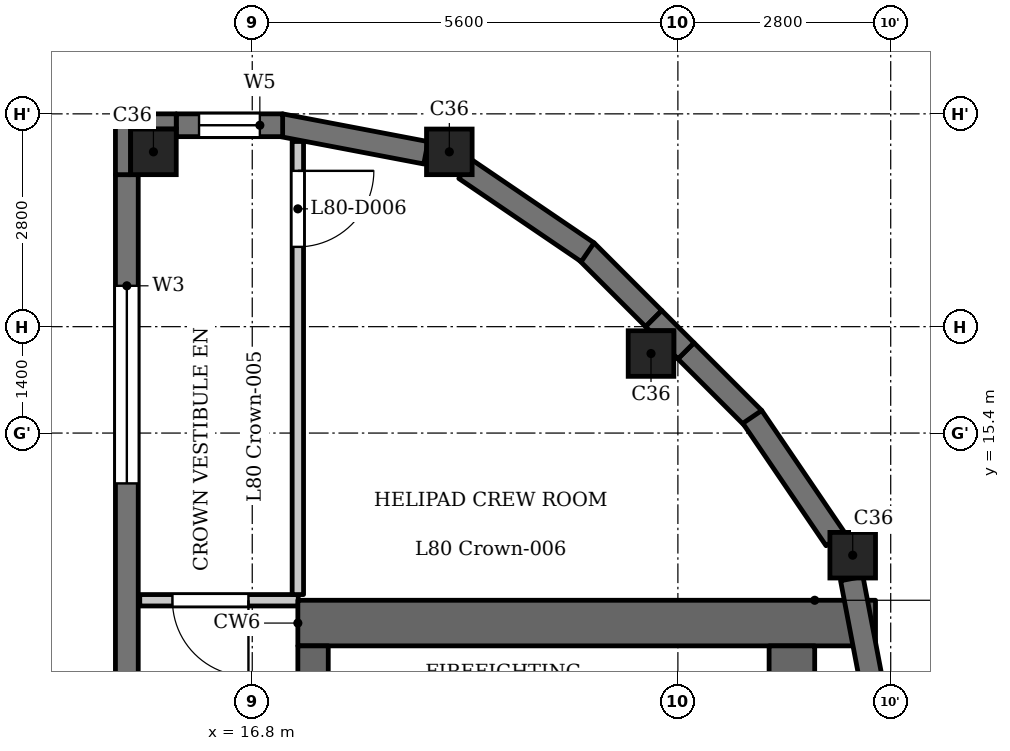
"""IFC4 building model, lengths in metres.
Left out: names, types, materials, properties, quantities, classifications, styles, units other than length and angle.
Written with IfcOpenShell. Run it as: python <this file> out.ifc"""

import sys

from ifc_helpers import new_model, si_unit, direction, frame, frame_2d, origin, origin_2d, place, context, subcontext, project, spatial, polyline, rectangle, outline, extrude, element, fill, save


model = new_model("IFC4")
c1 = context("Model", 3, precision=1e-05, world=origin(), true_north=direction((0.0, 1.0)))
c2 = subcontext(c1, "Body", "Model", "MODEL_VIEW")
j1 = project(units=[si_unit("LENGTHUNIT", "METRE"), si_unit("PLANEANGLEUNIT", "RADIAN")], contexts=[c1])
p1 = place(None, origin())
s1 = spatial("IfcSite", under=j1, at=p1, CompositionType="ELEMENT")
p2 = place(p1, origin())
s2 = spatial("IfcBuilding", under=s1, at=p2, CompositionType="ELEMENT")
p3 = place(p2, frame((0.0, 0.0, 310.4)))
s3 = spatial("IfcBuildingStorey", under=s2, at=p3, CompositionType="ELEMENT", Elevation=310.4)
for number, where, z_axis, x_axis in (
    (1, (15.5, 19.1, 0.0), (0.0, 0.0, 1.0), (1.0, 0.0, 0.0)),
    (2, (19.393, 19.1, 0.0), (0.0, 0.0, 1.0), (1.0, 0.0, 0.0)),
    (3, (22.046, 16.446, 0.0), (0.0, 0.0, 1.0), (1.0, 0.0, 0.0)),
    (4, (24.7, 13.793, 0.0), (0.0, 0.0, 1.0), (1.0, 0.0, 0.0)),
):
    element("IfcColumn", number, at=place(p3, frame(where, z_axis=z_axis, x_axis=x_axis)), inside=s3, PredefinedType="COLUMN", context=c2, shape_type="SweptSolid", body=[
        extrude(rectangle(XDim=0.6, YDim=0.6, at=origin_2d()), origin(), (0.0, 0.0, 1.0), 3.5),
    ])
p4 = place(p3, frame((15.15, 18.8, 0.0), z_axis=(0.0, 0.0, 1.0), x_axis=(0.0, -1.0, 0.0)))
e5 = element("IfcWall", 5, at=p4, inside=s3, PredefinedType="SOLIDWALL", context=c2, shape_type="SweptSolid", body=[
    extrude(rectangle(XDim=7.3, YDim=0.3, at=frame_2d((3.65, 0.0))), origin(), (0.0, 0.0, 1.0), 2.8),
])
p5 = place(p4, frame((1.462, 0.0, 0.9)))
e6 = element("IfcOpeningElement", 6, at=p5, cuts=e5, PredefinedType="OPENING", context=c2, shape_type="SweptSolid", body=[
    extrude(rectangle(XDim=2.6, YDim=1.25, at=frame_2d((1.3, 0.625))), frame((0.0, 0.16, 0.0), z_axis=(0.0, -1.0, 0.0), x_axis=(1.0, 0.0, 0.0)), (0.0, 0.0, 1.0), 0.32),
])
p6 = place(p3, frame((25.052, 11.573, 0.0), z_axis=(0.0, 0.0, 1.0), x_axis=(-0.187354129902, 0.982292436095, 0.0)))
e7 = element("IfcWall", 7, at=p6, inside=s3, PredefinedType="SOLIDWALL", context=c2, shape_type="SweptSolid", body=[
    extrude(rectangle(XDim=1.947, YDim=0.3, at=frame_2d((0.973, 0.0))), origin(), (0.0, 0.0, 1.0), 2.2),
])
p7 = place(p3, frame((24.474, 14.002, 0.0), z_axis=(0.0, 0.0, 1.0), x_axis=(-0.562025435703, 0.827119948752, 0.0)))
e8 = element("IfcWall", 8, at=p7, inside=s3, PredefinedType="SOLIDWALL", context=c2, shape_type="SweptSolid", body=[
    extrude(rectangle(XDim=1.948, YDim=0.3, at=frame_2d((0.974, 0.0))), origin(), (0.0, 0.0, 1.0), 2.2),
])
for number, where, z_axis, x_axis in (
    (9, (23.397, 15.591, 0.0), (0.0, 0.0, 1.0), (-0.707, 0.707, 0.0)),
    (10, (22.082, 16.906, 0.0), (0.0, 0.0, 1.0), (-0.707, 0.707, 0.0)),
):
    element("IfcWall", number, at=place(p3, frame(where, z_axis=z_axis, x_axis=x_axis)), inside=s3, PredefinedType="SOLIDWALL", context=c2, shape_type="SweptSolid", body=[
        extrude(rectangle(XDim=1.26, YDim=0.3, at=frame_2d((0.63, 0.0))), origin(), (0.0, 0.0, 1.0), 2.8),
    ])
for number, where, z_axis, x_axis in (
    (11, (21.213, 17.779, 0.0), (0.0, 0.0, 1.0), (-0.827, 0.562, 0.0)),
    (12, (19.085, 19.088, 0.0), (0.0, 0.0, 1.0), (-0.982, 0.187, 0.0)),
):
    element("IfcWall", number, at=place(p3, frame(where, z_axis=z_axis, x_axis=x_axis)), inside=s3, PredefinedType="SOLIDWALL", context=c2, shape_type="SweptSolid", body=[
        extrude(rectangle(XDim=1.948, YDim=0.3, at=frame_2d((0.974, 0.0))), origin(), (0.0, 0.0, 1.0), 2.2),
    ])
p8 = place(p3, frame((17.2, 19.45, 0.0), z_axis=(0.0, 0.0, 1.0), x_axis=(-1.0, 0.0, 0.0)))
e13 = element("IfcWall", 13, at=p8, inside=s3, PredefinedType="SOLIDWALL", context=c2, shape_type="SweptSolid", body=[
    extrude(rectangle(XDim=1.4, YDim=0.3, at=frame_2d((0.7, 0.0))), origin(), (0.0, 0.0, 1.0), 2.8),
])
p9 = place(p8, frame((0.3, 0.0, 0.6)))
e14 = element("IfcOpeningElement", 14, at=p9, cuts=e13, PredefinedType="OPENING", context=c2, shape_type="SweptSolid", body=[
    extrude(rectangle(XDim=0.8, YDim=1.55, at=frame_2d((0.4, 0.775))), frame((0.0, 0.16, 0.0), z_axis=(0.0, -1.0, 0.0), x_axis=(1.0, 0.0, 0.0)), (0.0, 0.0, 1.0), 0.32),
])
p10 = place(p3, frame((17.4, 12.9, 0.0), z_axis=(0.0, 0.0, 1.0), x_axis=(1.0, 0.0, 0.0)))
e15 = element("IfcWall", 15, at=p10, inside=s3, PredefinedType="SHEAR", context=c2, shape_type="SweptSolid", body=[
    extrude(rectangle(XDim=7.6, YDim=0.6, at=frame_2d((3.8, 0.0))), origin(), (0.0, 0.0, 1.0), 2.8),
])
p11 = place(p3, frame((17.6, -12.6, 0.0), z_axis=(0.0, 0.0, 1.0), x_axis=(0.0, 1.0, 0.0)))
e16 = element("IfcWall", 16, at=p11, inside=s3, PredefinedType="SHEAR", context=c2, shape_type="SweptSolid", body=[
    extrude(rectangle(XDim=25.2, YDim=0.4, at=frame_2d((12.6, 0.0))), origin(), (0.0, 0.0, 1.0), 2.8),
])
p12 = place(p11, frame((6.475, 0.0, 0.0)))
e17 = element("IfcOpeningElement", 17, at=p12, cuts=e16, PredefinedType="OPENING", context=c2, shape_type="SweptSolid", body=[
    extrude(rectangle(XDim=0.9, YDim=2.1, at=frame_2d((0.45, 1.05))), frame((0.0, 0.21, 0.0), z_axis=(0.0, -1.0, 0.0), x_axis=(1.0, 0.0, 0.0)), (0.0, 0.0, 1.0), 0.42),
])
p13 = place(p11, frame((10.075, 0.0, 0.0)))
e18 = element("IfcOpeningElement", 18, at=p13, cuts=e16, PredefinedType="OPENING", context=c2, shape_type="SweptSolid", body=[
    extrude(rectangle(XDim=0.9, YDim=2.1, at=frame_2d((0.45, 1.05))), frame((0.0, 0.21, 0.0), z_axis=(0.0, -1.0, 0.0), x_axis=(1.0, 0.0, 0.0)), (0.0, 0.0, 1.0), 0.42),
])
p14 = place(p11, frame((17.05, 0.0, 0.0)))
e19 = element("IfcOpeningElement", 19, at=p14, cuts=e16, PredefinedType="OPENING", context=c2, shape_type="SweptSolid", body=[
    extrude(rectangle(XDim=0.9, YDim=2.1, at=frame_2d((0.45, 1.05))), frame((0.0, 0.21, 0.0), z_axis=(0.0, -1.0, 0.0), x_axis=(1.0, 0.0, 0.0)), (0.0, 0.0, 1.0), 0.42),
])
p15 = place(p11, frame((23.25, 0.0, 0.0)))
e20 = element("IfcOpeningElement", 20, at=p15, cuts=e16, PredefinedType="OPENING", context=c2, shape_type="SweptSolid", body=[
    extrude(rectangle(XDim=1.1, YDim=2.1, at=frame_2d((0.55, 1.05))), frame((0.0, 0.21, 0.0), z_axis=(0.0, -1.0, 0.0), x_axis=(1.0, 0.0, 0.0)), (0.0, 0.0, 1.0), 0.42),
])
p16 = place(p11, frame((0.85, 0.0, 0.0)))
e21 = element("IfcOpeningElement", 21, at=p16, cuts=e16, PredefinedType="OPENING", context=c2, shape_type="SweptSolid", body=[
    extrude(rectangle(XDim=1.1, YDim=2.1, at=frame_2d((0.55, 1.05))), frame((0.0, 0.21, 0.0), z_axis=(0.0, -1.0, 0.0), x_axis=(1.0, 0.0, 0.0)), (0.0, 0.0, 1.0), 0.42),
])
p17 = place(p11, frame((13.075, 0.0, 0.0)))
e22 = element("IfcOpeningElement", 22, at=p17, cuts=e16, PredefinedType="OPENING", context=c2, shape_type="SweptSolid", body=[
    extrude(rectangle(XDim=1.8, YDim=2.1, at=frame_2d((0.9, 1.05))), frame((0.0, 0.21, 0.0), z_axis=(0.0, -1.0, 0.0), x_axis=(1.0, 0.0, 0.0)), (0.0, 0.0, 1.0), 0.42),
])
p18 = place(p3, frame((23.9, -12.6, 0.0), z_axis=(0.0, 0.0, 1.0), x_axis=(0.0, 1.0, 0.0)))
e23 = element("IfcWall", 23, at=p18, inside=s3, PredefinedType="SHEAR", context=c2, shape_type="SweptSolid", body=[
    extrude(rectangle(XDim=25.2, YDim=0.6, at=frame_2d((12.6, 0.0))), origin(), (0.0, 0.0, 1.0), 2.8),
])
p19 = place(p3, frame((15.32, 13.2, 0.0), z_axis=(0.0, 0.0, 1.0), x_axis=(1.0, 0.0, 0.0)))
e24 = element("IfcWall", 24, at=p19, inside=s3, PredefinedType="PARTITIONING", context=c2, shape_type="SweptSolid", body=[
    extrude(rectangle(XDim=2.085, YDim=0.15, at=frame_2d((1.042, 0.0))), origin(), (0.0, 0.0, 1.0), 2.8),
])
p20 = place(p19, frame((0.43, 0.0, 0.0)))
e25 = element("IfcOpeningElement", 25, at=p20, cuts=e24, PredefinedType="OPENING", context=c2, shape_type="SweptSolid", body=[
    extrude(rectangle(XDim=1.0, YDim=2.1, at=frame_2d((0.5, 1.05))), frame((0.0, 0.085, 0.0), z_axis=(0.0, -1.0, 0.0), x_axis=(1.0, 0.0, 0.0)), (0.0, 0.0, 1.0), 0.17),
])
p21 = place(p3, frame((17.4, 13.275, 0.0), z_axis=(0.0, 0.0, 1.0), x_axis=(0.0, 1.0, 0.0)))
e26 = element("IfcWall", 26, at=p21, inside=s3, PredefinedType="PARTITIONING", context=c2, shape_type="SweptSolid", body=[
    extrude(rectangle(XDim=5.961, YDim=0.15, at=frame_2d((2.981, 0.0))), origin(), (0.0, 0.0, 1.0), 2.8),
])
p22 = place(p21, frame((4.575, 0.0, 0.0)))
e27 = element("IfcOpeningElement", 27, at=p22, cuts=e26, PredefinedType="OPENING", context=c2, shape_type="SweptSolid", body=[
    extrude(rectangle(XDim=1.0, YDim=2.1, at=frame_2d((0.5, 1.05))), frame((0.0, 0.085, 0.0), z_axis=(0.0, -1.0, 0.0), x_axis=(1.0, 0.0, 0.0)), (0.0, 0.0, 1.0), 0.17),
])
p23 = place(p3, origin())
e28 = element("IfcWall", 28, at=p23, inside=s3, PredefinedType="SOLIDWALL", context=c2, shape_type="SweptSolid", body=[
    extrude(outline(polyline([(22.4, 16.376), (22.612, 16.588), (22.188, 17.012), (21.976, 16.8), (22.029, 16.746), (22.346, 16.746), (22.346, 16.429), (22.4, 16.376)])), origin(), (0.0, 0.0, 1.0), 2.8),
])
e29 = element("IfcWall", 29, at=p23, inside=s3, PredefinedType="SOLIDWALL", context=c2, shape_type="SweptSolid", body=[
    extrude(outline(polyline([(15.8, 19.6), (15.0, 19.6), (15.0, 18.8), (15.2, 18.8), (15.2, 19.4), (15.8, 19.4), (15.8, 19.6)])), origin(), (0.0, 0.0, 1.0), 2.8),
])
p24 = place(p20, origin())
e30 = element("IfcDoor", 30, at=p24, inside=s3, OperationType="SINGLE_SWING_RIGHT", PredefinedType="DOOR", context=c2, shape_type="SweptSolid", body=[
    extrude(rectangle(XDim=1.0, YDim=2.1, at=frame_2d((0.5, 1.05))), frame((0.0, 0.025, 0.0), z_axis=(0.0, -1.0, 0.0), x_axis=(1.0, 0.0, 0.0)), (0.0, 0.0, 1.0), 0.05),
])
fill(e25, e30)
p25 = place(p22, origin())
e31 = element("IfcDoor", 31, at=p25, inside=s3, OperationType="SINGLE_SWING_RIGHT", PredefinedType="DOOR", context=c2, shape_type="SweptSolid", body=[
    extrude(rectangle(XDim=1.0, YDim=2.1, at=frame_2d((0.5, 1.05))), frame((0.0, 0.025, 0.0), z_axis=(0.0, -1.0, 0.0), x_axis=(1.0, 0.0, 0.0)), (0.0, 0.0, 1.0), 0.05),
])
fill(e27, e31)
p26 = place(p5, origin())
e32 = element("IfcWindow", 32, at=p26, inside=s3, PartitioningType="SINGLE_PANEL", PredefinedType="WINDOW", context=c2, shape_type="SweptSolid", body=[
    extrude(rectangle(XDim=2.6, YDim=1.25, at=frame_2d((1.3, 0.625))), frame((0.0, 0.03, 0.0), z_axis=(0.0, -1.0, 0.0), x_axis=(1.0, 0.0, 0.0)), (0.0, 0.0, 1.0), 0.06),
])
fill(e6, e32)
p27 = place(p9, origin())
e33 = element("IfcWindow", 33, at=p27, inside=s3, PartitioningType="SINGLE_PANEL", PredefinedType="WINDOW", context=c2, shape_type="SweptSolid", body=[
    extrude(rectangle(XDim=0.8, YDim=1.55, at=frame_2d((0.4, 0.775))), frame((0.0, 0.03, 0.0), z_axis=(0.0, -1.0, 0.0), x_axis=(1.0, 0.0, 0.0)), (0.0, 0.0, 1.0), 0.06),
])
fill(e14, e33)
save(model, sys.argv[1])
